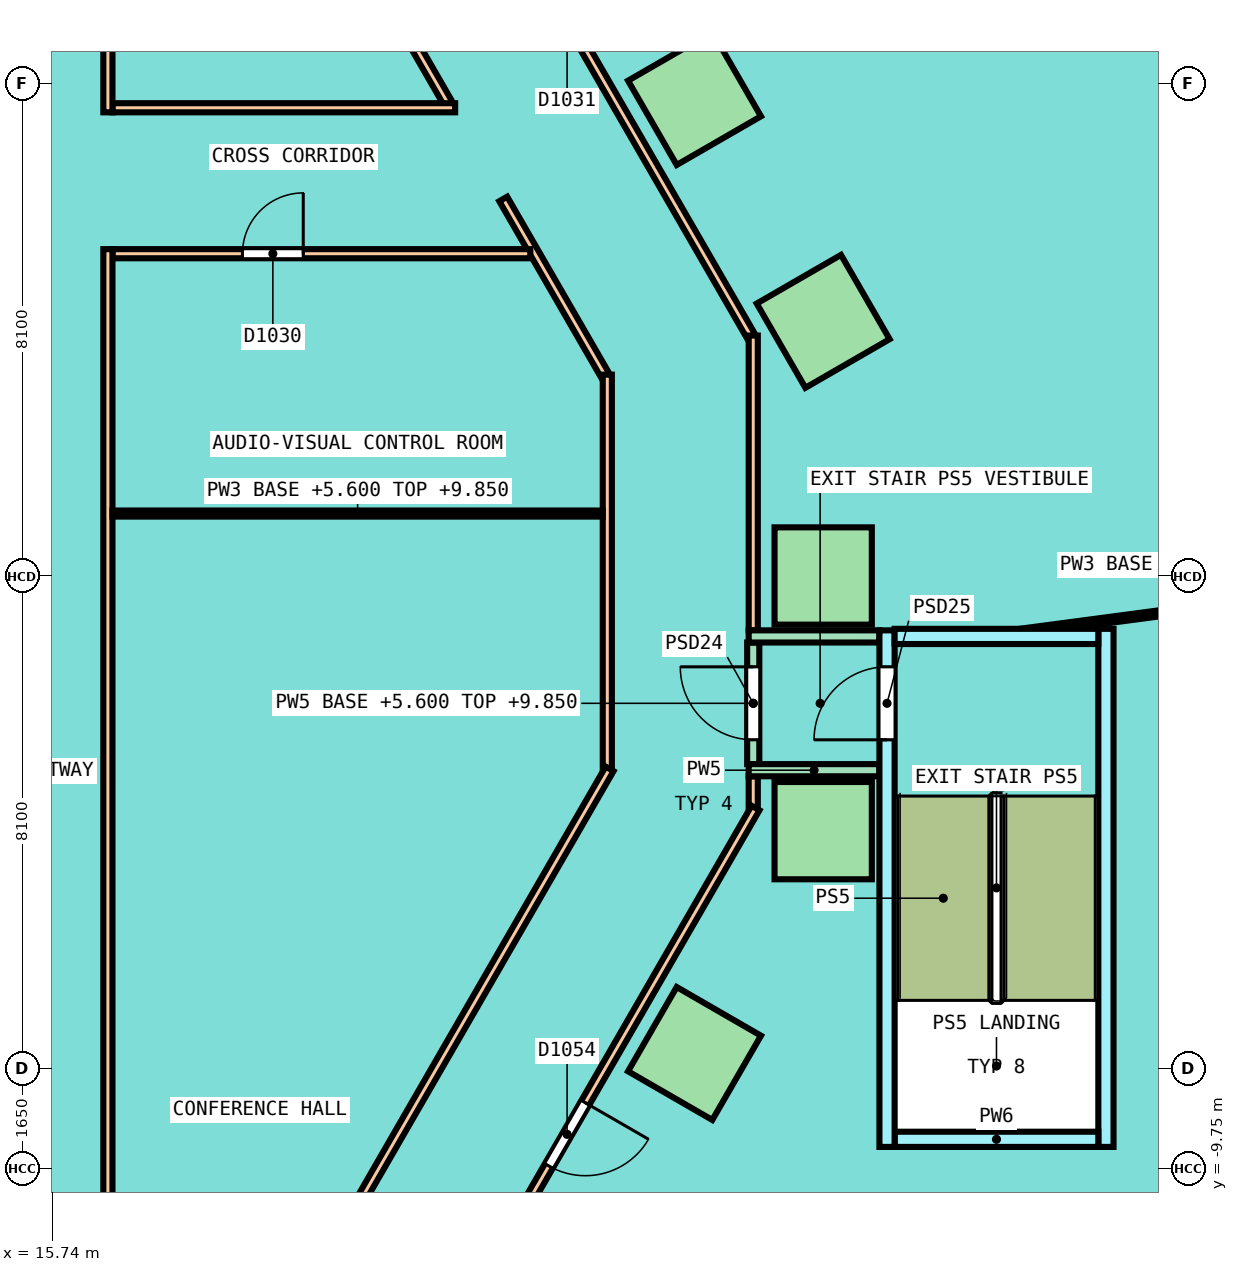
"""IFC4 building model, lengths in metres.
Left out: names, types, materials, properties, quantities, classifications, styles, units other than length and angle.
Written with IfcOpenShell. Run it as: python <this file> out.ifc"""

import sys

from ifc_helpers import new_model, si_unit, direction, frame, frame_2d, origin, origin_2d, place, context, subcontext, project, spatial, rectangle, extrude, element, fill, save


model = new_model("IFC4")
c1 = context("Model", 3, precision=1e-05, world=origin(), true_north=direction((0.0, 1.0)))
c2 = subcontext(c1, "Body", "Model", "MODEL_VIEW")
j1 = project(units=[si_unit("LENGTHUNIT", "METRE"), si_unit("PLANEANGLEUNIT", "RADIAN")], contexts=[c1])
p1 = place(None, origin())
s1 = spatial("IfcSite", under=j1, at=p1, CompositionType="ELEMENT")
p2 = place(p1, origin())
s2 = spatial("IfcBuilding", under=s1, at=p2, CompositionType="ELEMENT")
p3 = place(p2, frame((0.0, 0.0, 5.6)))
s3 = spatial("IfcBuildingStorey", under=s2, at=p3, CompositionType="ELEMENT", Elevation=5.6)
for number, where, z_axis, x_axis in (
    (1, (28.413, -4.188, 0.0), (0.0, 0.0, 1.0), (0.0, 1.0, 0.0)),
    (2, (28.413, 0.0, 0.0), (0.0, 0.0, 1.0), (0.0, 1.0, 0.0)),
    (3, (28.413, 4.188, 0.0), (0.0, 0.0, 1.0), (-0.5, 0.866, 0.0)),
    (4, (26.297, 7.853, 0.0), (0.0, 0.0, 1.0), (-0.5, 0.866, 0.0)),
    (5, (26.297, -7.853, 0.0), (0.0, 0.0, 1.0), (0.5, 0.866, 0.0)),
):
    element("IfcColumn", number, at=place(p3, frame(where, z_axis=z_axis, x_axis=x_axis)), inside=s3, PredefinedType="COLUMN", context=c2, shape_type="SweptSolid", body=[
        extrude(rectangle(XDim=1.6, YDim=1.6, at=origin_2d()), origin(), (0.0, 0.0, 1.0), 4.25),
    ])
p4 = place(p3, frame((15.272, 19.849, 0.0), z_axis=(0.0, 0.0, 1.0), x_axis=(0.500000635496, -0.86602503688, 0.0)))
e6 = element("IfcWall", 6, at=p4, inside=s3, PredefinedType="PARTITIONING", context=c2, shape_type="SweptSolid", body=[
    extrude(rectangle(XDim=13.953, YDim=0.15, at=frame_2d((6.977, 0.0))), origin(), (0.0, 0.0, 1.0), 3.2),
])
p5 = place(p4, frame((9.577, 0.0, 0.0)))
e7 = element("IfcOpeningElement", 7, at=p5, cuts=e6, PredefinedType="OPENING", context=c2, shape_type="SweptSolid", body=[
    extrude(rectangle(XDim=1.0, YDim=2.1, at=frame_2d((0.5, 1.05))), frame((0.0, 0.085, 0.0), z_axis=(0.0, -1.0, 0.0), x_axis=(1.0, 0.0, 0.0)), (0.0, 0.0, 1.0), 0.17),
])
p6 = place(p3, frame((23.152, 6.2, 0.0), z_axis=(0.0, 0.0, 1.0), x_axis=(0.499943416353, -0.866058069904, 0.0)))
e8 = element("IfcWall", 8, at=p6, inside=s3, PredefinedType="PARTITIONING", context=c2, shape_type="SweptSolid", body=[
    extrude(rectangle(XDim=3.348, YDim=0.15, at=frame_2d((1.674, 0.0))), origin(), (0.0, 0.0, 1.0), 3.2),
])
p7 = place(p3, frame((16.725, 5.3, 0.0), z_axis=(0.0, 0.0, 1.0), x_axis=(1.0, 0.0, 0.0)))
e9 = element("IfcWall", 9, at=p7, inside=s3, PredefinedType="PARTITIONING", context=c2, shape_type="SweptSolid", body=[
    extrude(rectangle(XDim=6.871, YDim=0.15, at=frame_2d((3.436, 0.0))), origin(), (0.0, 0.0, 1.0), 3.2),
])
p8 = place(p7, frame((2.137, 0.0, 0.0)))
e10 = element("IfcOpeningElement", 10, at=p8, cuts=e9, PredefinedType="OPENING", context=c2, shape_type="SweptSolid", body=[
    extrude(rectangle(XDim=1.0, YDim=2.1, at=frame_2d((0.5, 1.05))), frame((0.0, 0.085, 0.0), z_axis=(0.0, -1.0, 0.0), x_axis=(1.0, 0.0, 0.0)), (0.0, 0.0, 1.0), 0.17),
])
p9 = place(p3, frame((16.725, 7.7, 0.0), z_axis=(0.0, 0.0, 1.0), x_axis=(1.0, 0.0, 0.0)))
e11 = element("IfcWall", 11, at=p9, inside=s3, PredefinedType="PARTITIONING", context=c2, shape_type="SweptSolid", body=[
    extrude(rectangle(XDim=5.635, YDim=0.15, at=frame_2d((2.818, 0.0))), origin(), (0.0, 0.0, 1.0), 3.2),
])
p10 = place(p3, frame((24.863, -3.161, 0.0), z_axis=(0.0, 0.0, 1.0), x_axis=(0.0, 1.0, 0.0)))
e12 = element("IfcWall", 12, at=p10, inside=s3, PredefinedType="PARTITIONING", context=c2, shape_type="SweptSolid", body=[
    extrude(rectangle(XDim=6.473, YDim=0.15, at=frame_2d((3.236, 0.0))), origin(), (0.0, 0.0, 1.0), 3.2),
])
p11 = place(p3, frame((17.029, 21.606, 0.0), z_axis=(0.0, 0.0, 1.0), x_axis=(0.499999139641, -0.866025900512, 0.0)))
e13 = element("IfcWall", 13, at=p11, inside=s3, PredefinedType="PARTITIONING", context=c2, shape_type="SweptSolid", body=[
    extrude(rectangle(XDim=20.394, YDim=0.15, at=frame_2d((10.197, 0.0))), origin(), (0.0, 0.0, 1.0), 3.2),
])
p12 = place(p11, frame((13.746, 0.0, 0.0)))
e14 = element("IfcOpeningElement", 14, at=p12, cuts=e13, PredefinedType="OPENING", context=c2, shape_type="SweptSolid", body=[
    extrude(rectangle(XDim=1.2, YDim=2.1, at=frame_2d((0.6, 1.05))), frame((0.0, 0.085, 0.0), z_axis=(0.0, -1.0, 0.0), x_axis=(1.0, 0.0, 0.0)), (0.0, 0.0, 1.0), 0.17),
])
p13 = place(p3, frame((27.263, -3.804, 0.0), z_axis=(0.0, 0.0, 1.0), x_axis=(0.0, 1.0, 0.0)))
e15 = element("IfcWall", 15, at=p13, inside=s3, PredefinedType="PARTITIONING", context=c2, shape_type="SweptSolid", body=[
    extrude(rectangle(XDim=0.511, YDim=0.15, at=frame_2d((0.255, 0.0))), origin(), (0.0, 0.0, 1.0), 3.2),
])
p14 = place(p3, frame((27.263, -0.894, 0.0), z_axis=(0.0, 0.0, 1.0), x_axis=(0.0, 1.0, 0.0)))
e16 = element("IfcWall", 16, at=p14, inside=s3, PredefinedType="PARTITIONING", context=c2, shape_type="SweptSolid", body=[
    extrude(rectangle(XDim=4.848, YDim=0.15, at=frame_2d((2.424, 0.0))), origin(), (0.0, 0.0, 1.0), 3.2),
])
p15 = place(p3, frame((16.954, -21.736, 0.0), z_axis=(0.0, 0.0, 1.0), x_axis=(0.499996491498, 0.86602742941, 0.0)))
e17 = element("IfcWall", 17, at=p15, inside=s3, PredefinedType="PARTITIONING", context=c2, shape_type="SweptSolid", body=[
    extrude(rectangle(XDim=20.694, YDim=0.15, at=frame_2d((10.347, 0.0))), origin(), (0.0, 0.0, 1.0), 3.2),
])
p16 = place(p15, frame((13.896, 0.0, 0.0)))
e18 = element("IfcOpeningElement", 18, at=p16, cuts=e17, PredefinedType="OPENING", context=c2, shape_type="SweptSolid", body=[
    extrude(rectangle(XDim=1.2, YDim=2.1, at=frame_2d((0.6, 1.05))), frame((0.0, 0.085, 0.0), z_axis=(0.0, -1.0, 0.0), x_axis=(1.0, 0.0, 0.0)), (0.0, 0.0, 1.0), 0.17),
])
p17 = place(p3, frame((15.197, -19.979, 0.0), z_axis=(0.0, 0.0, 1.0), x_axis=(0.500000497866, 0.866025116341, 0.0)))
e19 = element("IfcWall", 19, at=p17, inside=s3, PredefinedType="PARTITIONING", context=c2, shape_type="SweptSolid", body=[
    extrude(rectangle(XDim=19.407, YDim=0.15, at=frame_2d((9.704, 0.0))), origin(), (0.0, 0.0, 1.0), 3.2),
])
p18 = place(p17, frame((6.5, 0.0, 0.0)))
e20 = element("IfcOpeningElement", 20, at=p18, cuts=e19, PredefinedType="OPENING", context=c2, shape_type="SweptSolid", body=[
    extrude(rectangle(XDim=1.2, YDim=2.1, at=frame_2d((0.6, 1.05))), frame((0.0, 0.085, 0.0), z_axis=(0.0, -1.0, 0.0), x_axis=(1.0, 0.0, 0.0)), (0.0, 0.0, 1.0), 0.17),
])
p19 = place(p3, frame((16.65, -14.175, 0.0), z_axis=(0.0, 0.0, 1.0), x_axis=(0.0, 1.0, 0.0)))
e21 = element("IfcWall", 21, at=p19, inside=s3, PredefinedType="PARTITIONING", context=c2, shape_type="SweptSolid", body=[
    extrude(rectangle(XDim=19.55, YDim=0.15, at=frame_2d((9.775, 0.0))), origin(), (0.0, 0.0, 1.0), 3.2),
])
p20 = place(p3, frame((16.65, 7.625, 0.0), z_axis=(0.0, 0.0, 1.0), x_axis=(0.0, 1.0, 0.0)))
e22 = element("IfcWall", 22, at=p20, inside=s3, PredefinedType="PARTITIONING", context=c2, shape_type="SweptSolid", body=[
    extrude(rectangle(XDim=6.55, YDim=0.15, at=frame_2d((3.275, 0.0))), origin(), (0.0, 0.0, 1.0), 3.2),
])
p21 = place(p3, frame((27.263, -3.094, 0.0), z_axis=(0.0, 0.0, 1.0), x_axis=(0.0, 1.0, 0.0)))
e23 = element("IfcWall", 23, at=p21, inside=s3, PredefinedType="PARTITIONING", context=c2, shape_type="SweptSolid", body=[
    extrude(rectangle(XDim=2.0, YDim=0.2, at=frame_2d((1.0, 0.0))), origin(), (0.0, 0.0, 1.0), 4.25),
])
p22 = place(p21, frame((1.6, 0.0, 0.0), z_axis=(0.0, 0.0, 1.0), x_axis=(-1.0, 0.0, 0.0)))
e24 = element("IfcOpeningElement", 24, at=p22, cuts=e23, PredefinedType="OPENING", context=c2, shape_type="SweptSolid", body=[
    extrude(rectangle(XDim=1.2, YDim=2.1, at=frame_2d((0.6, 1.05))), frame((0.0, 0.11, 0.0), z_axis=(0.0, -1.0, 0.0), x_axis=(1.0, 0.0, 0.0)), (0.0, 0.0, 1.0), 0.22),
])
for number, where, z_axis, x_axis in (
    (25, (27.188, -0.994, 0.0), (0.0, 0.0, 1.0), (1.0, 0.0, 0.0)),
    (26, (27.188, -3.194, 0.0), (0.0, 0.0, 1.0), (1.0, 0.0, 0.0)),
):
    element("IfcWall", number, at=place(p3, frame(where, z_axis=z_axis, x_axis=x_axis)), inside=s3, PredefinedType="PARTITIONING", context=c2, shape_type="SweptSolid", body=[
        extrude(rectangle(XDim=2.15, YDim=0.2, at=frame_2d((1.075, 0.0))), origin(), (0.0, 0.0, 1.0), 3.35),
    ])
p23 = place(p3, frame((16.725, 1.027, 0.0), z_axis=(0.0, 0.0, 1.0), x_axis=(1.0, 0.0, 0.0)))
e27 = element("IfcWall", 27, at=p23, inside=s3, PredefinedType="PARTITIONING", context=c2, shape_type="SweptSolid", body=[
    extrude(rectangle(XDim=8.063, YDim=0.1, at=frame_2d((4.031, 0.0))), origin(), (0.0, 0.0, 1.0), 4.25),
])
p24 = place(p3, frame((31.202, -0.977, 0.0), z_axis=(0.0, 0.0, 1.0), x_axis=(0.991316158705, 0.13150008932, 0.0)))
e28 = element("IfcWall", 28, at=p24, inside=s3, PredefinedType="PARTITIONING", context=c2, shape_type="SweptSolid", body=[
    extrude(rectangle(XDim=7.229, YDim=0.1, at=frame_2d((3.615, 0.0))), origin(), (0.0, 0.0, 1.0), 4.25),
])
p25 = place(p3, frame((33.063, -9.389, 0.0), z_axis=(0.0, 0.0, 1.0), x_axis=(0.0, 1.0, 0.0)))
e29 = element("IfcWall", 29, at=p25, inside=s3, PredefinedType="SOLIDWALL", context=c2, shape_type="SweptSolid", body=[
    extrude(rectangle(XDim=8.52, YDim=0.25, at=frame_2d((4.26, 0.0))), origin(), (0.0, 0.0, 1.0), 4.25),
])
p26 = place(p3, frame((29.588, -9.264, 0.0), z_axis=(0.0, 0.0, 1.0), x_axis=(1.0, 0.0, 0.0)))
e30 = element("IfcWall", 30, at=p26, inside=s3, PredefinedType="SOLIDWALL", context=c2, shape_type="SweptSolid", body=[
    extrude(rectangle(XDim=3.35, YDim=0.25, at=frame_2d((1.675, 0.0))), origin(), (0.0, 0.0, 1.0), 4.25),
])
p27 = place(p3, frame((29.463, -9.389, 0.0), z_axis=(0.0, 0.0, 1.0), x_axis=(0.0, 1.0, 0.0)))
e31 = element("IfcWall", 31, at=p27, inside=s3, PredefinedType="SOLIDWALL", context=c2, shape_type="SweptSolid", body=[
    extrude(rectangle(XDim=8.495, YDim=0.25, at=frame_2d((4.248, 0.0))), origin(), (0.0, 0.0, 1.0), 4.25),
])
p28 = place(p27, frame((7.895, 0.0, 0.0), z_axis=(0.0, 0.0, 1.0), x_axis=(-1.0, 0.0, 0.0)))
e32 = element("IfcOpeningElement", 32, at=p28, cuts=e31, PredefinedType="OPENING", context=c2, shape_type="SweptSolid", body=[
    extrude(rectangle(XDim=1.2, YDim=2.1, at=frame_2d((0.6, 1.05))), frame((0.0, 0.135, 0.0), z_axis=(0.0, -1.0, 0.0), x_axis=(1.0, 0.0, 0.0)), (0.0, 0.0, 1.0), 0.27),
])
p29 = place(p3, frame((29.588, -0.994, 0.0), z_axis=(0.0, 0.0, 1.0), x_axis=(1.0, 0.0, 0.0)))
e33 = element("IfcWall", 33, at=p29, inside=s3, PredefinedType="SOLIDWALL", context=c2, shape_type="SweptSolid", body=[
    extrude(rectangle(XDim=3.35, YDim=0.25, at=frame_2d((1.675, 0.0))), origin(), (0.0, 0.0, 1.0), 4.25),
])
p30 = place(p8, origin())
e34 = element("IfcDoor", 34, at=p30, inside=s3, OperationType="SINGLE_SWING_LEFT", PredefinedType="DOOR", context=c2, shape_type="SweptSolid", body=[
    extrude(rectangle(XDim=1.0, YDim=2.1, at=frame_2d((0.5, 1.05))), frame((0.0, 0.025, 0.0), z_axis=(0.0, -1.0, 0.0), x_axis=(1.0, 0.0, 0.0)), (0.0, 0.0, 1.0), 0.05),
])
fill(e10, e34)
p31 = place(p16, origin())
e35 = element("IfcDoor", 35, at=p31, inside=s3, OperationType="DOUBLE_DOOR_SINGLE_SWING", PredefinedType="DOOR", context=c2, shape_type="SweptSolid", body=[
    extrude(rectangle(XDim=1.2, YDim=2.1, at=frame_2d((0.6, 1.05))), frame((0.0, 0.025, 0.0), z_axis=(0.0, -1.0, 0.0), x_axis=(1.0, 0.0, 0.0)), (0.0, 0.0, 1.0), 0.05),
])
fill(e18, e35)
p32 = place(p22, origin())
e36 = element("IfcDoor", 36, at=p32, inside=s3, OperationType="SINGLE_SWING_LEFT", PredefinedType="DOOR", context=c2, shape_type="SweptSolid", body=[
    extrude(rectangle(XDim=1.2, YDim=2.1, at=frame_2d((0.6, 1.05))), frame((0.0, 0.025, 0.0), z_axis=(0.0, -1.0, 0.0), x_axis=(1.0, 0.0, 0.0)), (0.0, 0.0, 1.0), 0.05),
])
fill(e24, e36)
p33 = place(p28, origin())
e37 = element("IfcDoor", 37, at=p33, inside=s3, OperationType="SINGLE_SWING_RIGHT", PredefinedType="DOOR", context=c2, shape_type="SweptSolid", body=[
    extrude(rectangle(XDim=1.2, YDim=2.1, at=frame_2d((0.6, 1.05))), frame((0.0, 0.025, 0.0), z_axis=(0.0, -1.0, 0.0), x_axis=(1.0, 0.0, 0.0)), (0.0, 0.0, 1.0), 0.05),
])
fill(e32, e37)
save(model, sys.argv[1])
